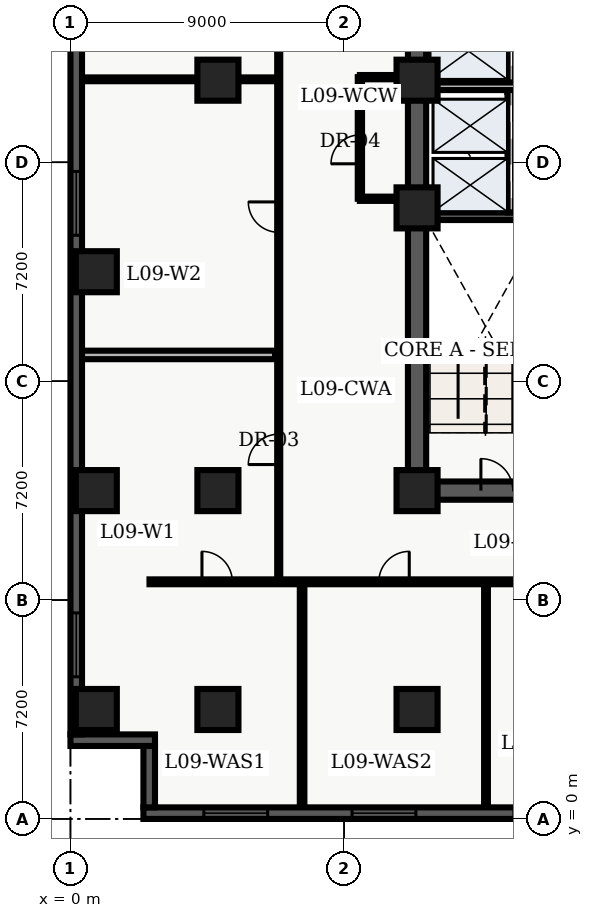
"""IFC4 building model, lengths in metres.
Left out: names, types, materials, properties, quantities, classifications, styles, units other than length and angle.
Written with IfcOpenShell. Run it as: python <this file> out.ifc"""

import sys

from ifc_helpers import new_model, entity, si_unit, converted_unit, direction, frame, origin_with_axes, origin_2d_with_axis, place, context, subcontext, project, spatial, polyline, rectangle, outline, extrude, element, fill, save


model = new_model("IFC4")
c1 = context("Model", 3, precision=1e-05, world=origin_with_axes(), true_north=direction((0.0, 1.0)))
c2 = subcontext(c1, "Body", "Model", "MODEL_VIEW")
j1 = project(units=[si_unit("LENGTHUNIT", "METRE"), converted_unit("PLANEANGLEUNIT", "DEGREE", entity("IfcPlaneAngleMeasure", 0.017), si_unit("PLANEANGLEUNIT", "RADIAN"), dimensions=[0, 0, 0, 0, 0, 0, 0])], contexts=[c1])
p1 = place(None, origin_with_axes())
s1 = spatial("IfcSite", under=j1, at=p1, CompositionType="ELEMENT")
p2 = place(p1, origin_with_axes())
s2 = spatial("IfcBuilding", under=s1, at=p2, CompositionType="ELEMENT")
p3 = place(p2, frame((0.0, 0.0, 40.5), z_axis=(0.0, 0.0, 1.0), x_axis=(1.0, 0.0, 0.0)))
s3 = spatial("IfcBuildingStorey", under=s2, at=p3, CompositionType="ELEMENT", Elevation=40.5)
p4 = place(p3, frame((11.4, 10.8, 0.0), z_axis=(0.0, 0.0, 1.0), x_axis=(0.0, 1.0, 0.0)))
e1 = element("IfcWall", 1, at=p4, inside=s3, PredefinedType="SHEAR", context=c2, shape_type="SweptSolid", body=[
    extrude(outline(polyline([(0.0, -0.3), (27.0, -0.3), (27.0, 0.3), (0.0, 0.3), (0.0, -0.3)])), origin_with_axes(), (0.0, 0.0, 1.0), 3.66),
])
p5 = place(p3, frame((11.4, 10.8, 0.0), z_axis=(0.0, 0.0, 1.0), x_axis=(1.0, 0.0, 0.0)))
e2 = element("IfcWall", 2, at=p5, inside=s3, PredefinedType="SHEAR", context=c2, shape_type="SweptSolid", body=[
    extrude(outline(polyline([(0.0, -0.3), (7.2, -0.3), (7.2, 0.3), (0.0, 0.3), (0.0, -0.3)])), origin_with_axes(), (0.0, 0.0, 1.0), 3.66),
])
p6 = place(p5, frame((2.625, 0.0, 0.0), z_axis=(0.0, 0.0, 1.0), x_axis=(1.0, 0.0, 0.0)))
e3 = element("IfcOpeningElement", 3, at=p6, cuts=e2, PredefinedType="OPENING", context=c2, shape_type="SweptSolid", body=[
    extrude(rectangle(XDim=1.05, YDim=0.62, at=origin_2d_with_axis()), origin_with_axes(), (0.0, 0.0, 1.0), 2.15),
])
p7 = place(p3, frame((11.7, 19.825, 0.0), z_axis=(0.0, 0.0, 1.0), x_axis=(1.0, 0.0, 0.0)))
e4 = element("IfcWall", 4, at=p7, inside=s3, PredefinedType="SHEAR", context=c2, shape_type="SweptSolid", body=[
    extrude(outline(polyline([(0.0, -0.125), (6.6, -0.125), (6.6, 0.125), (0.0, 0.125), (0.0, -0.125)])), origin_with_axes(), (0.0, 0.0, 1.0), 3.66),
])
p8 = place(p3, frame((14.5, 19.95, 0.0), z_axis=(0.0, 0.0, 1.0), x_axis=(0.0, 1.0, 0.0)))
e5 = element("IfcWall", 5, at=p8, inside=s3, PredefinedType="SOLIDWALL", context=c2, shape_type="SweptSolid", body=[
    extrude(outline(polyline([(0.0, -0.125), (6.25, -0.125), (6.25, 0.125), (0.0, 0.125), (0.0, -0.125)])), origin_with_axes(), (0.0, 0.0, 1.0), 2.7),
])
p9 = place(p8, frame((1.025, 0.0, 0.0), z_axis=(0.0, 0.0, 1.0), x_axis=(1.0, 0.0, 0.0)))
e6 = element("IfcOpeningElement", 6, at=p9, cuts=e5, PredefinedType="OPENING", context=c2, shape_type="SweptSolid", body=[
    extrude(rectangle(XDim=1.1, YDim=0.27, at=origin_2d_with_axis()), origin_with_axes(), (0.0, 0.0, 1.0), 2.15),
])
p10 = place(p8, frame((2.975, 0.0, 0.0), z_axis=(0.0, 0.0, 1.0), x_axis=(1.0, 0.0, 0.0)))
e7 = element("IfcOpeningElement", 7, at=p10, cuts=e5, PredefinedType="OPENING", context=c2, shape_type="SweptSolid", body=[
    extrude(rectangle(XDim=1.1, YDim=0.27, at=origin_2d_with_axis()), origin_with_axes(), (0.0, 0.0, 1.0), 2.15),
])
p11 = place(p8, frame((5.425, 0.0, 0.0), z_axis=(0.0, 0.0, 1.0), x_axis=(1.0, 0.0, 0.0)))
e8 = element("IfcOpeningElement", 8, at=p11, cuts=e5, PredefinedType="OPENING", context=c2, shape_type="SweptSolid", body=[
    extrude(rectangle(XDim=1.2, YDim=0.27, at=origin_2d_with_axis()), origin_with_axes(), (0.0, 0.0, 1.0), 2.15),
])
p12 = place(p3, frame((11.7, 24.1, 0.0), z_axis=(0.0, 0.0, 1.0), x_axis=(1.0, 0.0, 0.0)))
e9 = element("IfcWall", 9, at=p12, inside=s3, PredefinedType="SOLIDWALL", context=c2, shape_type="SweptSolid", body=[
    extrude(outline(polyline([(0.0, -0.125), (6.6, -0.125), (6.6, 0.125), (0.0, 0.125), (0.0, -0.125)])), origin_with_axes(), (0.0, 0.0, 1.0), 2.7),
])
p13 = place(p12, frame((3.75, 0.0, 0.0), z_axis=(0.0, 0.0, 1.0), x_axis=(1.0, 0.0, 0.0)))
e10 = element("IfcOpeningElement", 10, at=p13, cuts=e9, PredefinedType="OPENING", context=c2, shape_type="SweptSolid", body=[
    extrude(rectangle(XDim=0.9, YDim=0.27, at=origin_2d_with_axis()), origin_with_axes(), (0.0, 0.0, 1.0), 2.15),
])
for number, where, z_axis, x_axis in (
    (11, (11.4, 3.6, 0.0), (0.0, 0.0, 1.0), (1.0, 0.0, 0.0)),
    (12, (11.4, 10.8, 0.0), (0.0, 0.0, 1.0), (1.0, 0.0, 0.0)),
    (13, (11.4, 20.1, 0.0), (0.0, 0.0, 1.0), (1.0, 0.0, 0.0)),
    (14, (11.4, 24.3, 0.0), (0.0, 0.0, 1.0), (1.0, 0.0, 0.0)),
    (15, (4.85, 3.6, 0.0), (0.0, 0.0, 1.0), (1.0, 0.0, 0.0)),
    (16, (4.85, 10.8, 0.0), (0.0, 0.0, 1.0), (1.0, 0.0, 0.0)),
    (17, (4.85, 24.3, 0.0), (0.0, 0.0, 1.0), (1.0, 0.0, 0.0)),
    (18, (0.85, 3.6, 0.0), (0.0, 0.0, 1.0), (1.0, 0.0, 0.0)),
    (19, (0.85, 10.8, 0.0), (0.0, 0.0, 1.0), (1.0, 0.0, 0.0)),
    (20, (0.85, 18.0, 0.0), (0.0, 0.0, 1.0), (1.0, 0.0, 0.0)),
):
    element("IfcColumn", number, at=place(p3, frame(where, z_axis=z_axis, x_axis=x_axis)), inside=s3, PredefinedType="COLUMN", context=c2, shape_type="SweptSolid", body=[
        extrude(rectangle(XDim=1.35, YDim=1.35, at=origin_2d_with_axis()), origin_with_axes(), (0.0, 0.0, 1.0), 3.9),
    ])
p14 = place(p3, frame((9.52, 20.4, 0.0), z_axis=(0.0, 0.0, 1.0), x_axis=(0.0, 1.0, 0.0)))
e21 = element("IfcWall", 21, at=p14, inside=s3, PredefinedType="PARTITIONING", context=c2, shape_type="SweptSolid", body=[
    extrude(outline(polyline([(0.0, -0.07), (4.0, -0.07), (4.0, 0.07), (0.0, 0.07), (0.0, -0.07)])), origin_with_axes(), (0.0, 0.0, 1.0), 2.7),
])
p15 = place(p14, frame((1.625, 0.0, 0.0), z_axis=(0.0, 0.0, 1.0), x_axis=(1.0, 0.0, 0.0)))
e22 = element("IfcOpeningElement", 22, at=p15, cuts=e21, PredefinedType="OPENING", context=c2, shape_type="SweptSolid", body=[
    extrude(rectangle(XDim=0.95, YDim=0.16, at=origin_2d_with_axis()), origin_with_axes(), (0.0, 0.0, 1.0), 2.15),
])
for number, where, z_axis, x_axis in (
    (23, (9.52, 20.4, 0.0), (0.0, 0.0, 1.0), (1.0, 0.0, 0.0)),
    (24, (9.52, 24.4, 0.0), (0.0, 0.0, 1.0), (1.0, 0.0, 0.0)),
):
    element("IfcWall", number, at=place(p3, frame(where, z_axis=z_axis, x_axis=x_axis)), inside=s3, PredefinedType="PARTITIONING", context=c2, shape_type="SweptSolid", body=[
        extrude(outline(polyline([(0.0, -0.07), (1.58, -0.07), (1.58, 0.07), (0.0, 0.07), (0.0, -0.07)])), origin_with_axes(), (0.0, 0.0, 1.0), 2.7),
    ])
p16 = place(p3, frame((2.6, 7.8, 0.0), z_axis=(0.0, 0.0, 1.0), x_axis=(1.0, 0.0, 0.0)))
e25 = element("IfcWall", 25, at=p16, inside=s3, PredefinedType="PARTITIONING", context=c2, shape_type="SweptSolid", body=[
    extrude(outline(polyline([(0.0, -0.08), (18.55, -0.08), (18.55, 0.08), (0.0, 0.08), (0.0, -0.08)])), origin_with_axes(), (0.0, 0.0, 1.0), 2.7),
])
p17 = place(p16, frame((2.225, 0.0, 0.0), z_axis=(0.0, 0.0, 1.0), x_axis=(1.0, 0.0, 0.0)))
e26 = element("IfcOpeningElement", 26, at=p17, cuts=e25, PredefinedType="OPENING", context=c2, shape_type="SweptSolid", body=[
    extrude(rectangle(XDim=1.0, YDim=0.18, at=origin_2d_with_axis()), origin_with_axes(), (0.0, 0.0, 1.0), 2.15),
])
p18 = place(p16, frame((8.043, 0.0, 0.0), z_axis=(0.0, 0.0, 1.0), x_axis=(1.0, 0.0, 0.0)))
e27 = element("IfcOpeningElement", 27, at=p18, cuts=e25, PredefinedType="OPENING", context=c2, shape_type="SweptSolid", body=[
    extrude(rectangle(XDim=1.0, YDim=0.18, at=origin_2d_with_axis()), origin_with_axes(), (0.0, 0.0, 1.0), 2.15),
])
p19 = place(p16, frame((14.784, 0.0, 0.0), z_axis=(0.0, 0.0, 1.0), x_axis=(1.0, 0.0, 0.0)))
e28 = element("IfcOpeningElement", 28, at=p19, cuts=e25, PredefinedType="OPENING", context=c2, shape_type="SweptSolid", body=[
    extrude(rectangle(XDim=1.0, YDim=0.18, at=origin_2d_with_axis()), origin_with_axes(), (0.0, 0.0, 1.0), 2.15),
])
p20 = place(p3, frame((6.85, 7.8, 0.0), z_axis=(0.0, 0.0, 1.0), x_axis=(0.0, 1.0, 0.0)))
e29 = element("IfcWall", 29, at=p20, inside=s3, PredefinedType="PARTITIONING", context=c2, shape_type="SweptSolid", body=[
    extrude(outline(polyline([(0.0, -0.05), (32.7, -0.05), (32.7, 0.05), (0.0, 0.05), (0.0, -0.05)])), origin_with_axes(), (0.0, 0.0, 1.0), 2.7),
])
p21 = place(p20, frame((4.357, 0.0, 0.0), z_axis=(0.0, 0.0, 1.0), x_axis=(1.0, 0.0, 0.0)))
e30 = element("IfcOpeningElement", 30, at=p21, cuts=e29, PredefinedType="OPENING", context=c2, shape_type="SweptSolid", body=[
    extrude(rectangle(XDim=1.0, YDim=0.12, at=origin_2d_with_axis()), origin_with_axes(), (0.0, 0.0, 1.0), 2.15),
])
p22 = place(p20, frame((11.996, 0.0, 0.0), z_axis=(0.0, 0.0, 1.0), x_axis=(1.0, 0.0, 0.0)))
e31 = element("IfcOpeningElement", 31, at=p22, cuts=e29, PredefinedType="OPENING", context=c2, shape_type="SweptSolid", body=[
    extrude(rectangle(XDim=1.0, YDim=0.12, at=origin_2d_with_axis()), origin_with_axes(), (0.0, 0.0, 1.0), 2.15),
])
p23 = place(p20, frame((22.0, 0.0, 0.0), z_axis=(0.0, 0.0, 1.0), x_axis=(1.0, 0.0, 0.0)))
e32 = element("IfcOpeningElement", 32, at=p23, cuts=e29, PredefinedType="OPENING", context=c2, shape_type="SweptSolid", body=[
    extrude(rectangle(XDim=1.0, YDim=0.12, at=origin_2d_with_axis()), origin_with_axes(), (0.0, 0.0, 1.0), 2.15),
])
p24 = place(p20, frame((31.67, 0.0, 0.0), z_axis=(0.0, 0.0, 1.0), x_axis=(1.0, 0.0, 0.0)))
e33 = element("IfcOpeningElement", 33, at=p24, cuts=e29, PredefinedType="OPENING", context=c2, shape_type="SweptSolid", body=[
    extrude(rectangle(XDim=1.0, YDim=0.12, at=origin_2d_with_axis()), origin_with_axes(), (0.0, 0.0, 1.0), 2.15),
])
p25 = place(p3, frame((0.375, 15.263, 0.0), z_axis=(0.0, 0.0, 1.0), x_axis=(1.0, 0.0, 0.0)))
e34 = element("IfcWall", 34, at=p25, inside=s3, PredefinedType="PARTITIONING", context=c2, shape_type="SweptSolid", body=[
    extrude(outline(polyline([(0.0, -0.14), (6.355, -0.14), (6.355, 0.14), (0.0, 0.14), (0.0, -0.14)])), origin_with_axes(), (0.0, 0.0, 1.0), 2.7),
])
p26 = place(p3, frame((0.375, 24.329, 0.0), z_axis=(0.0, 0.0, 1.0), x_axis=(1.0, 0.0, 0.0)))
e35 = element("IfcWall", 35, at=p26, inside=s3, PredefinedType="PARTITIONING", context=c2, shape_type="SweptSolid", body=[
    extrude(outline(polyline([(0.0, -0.062), (6.355, -0.062), (6.355, 0.062), (0.0, 0.062), (0.0, -0.062)])), origin_with_axes(), (0.0, 0.0, 1.0), 2.7),
])
p27 = place(p3, frame((7.619, 0.36, 0.0), z_axis=(0.0, 0.0, 1.0), x_axis=(0.0, 1.0, 0.0)))
e36 = element("IfcWall", 36, at=p27, inside=s3, PredefinedType="PARTITIONING", context=c2, shape_type="SweptSolid", body=[
    extrude(outline(polyline([(0.0, -0.075), (7.34, -0.075), (7.34, 0.075), (0.0, 0.075), (0.0, -0.075)])), origin_with_axes(), (0.0, 0.0, 1.0), 2.7),
])
p28 = place(p3, frame((13.668, 0.36, 0.0), z_axis=(0.0, 0.0, 1.0), x_axis=(0.0, 1.0, 0.0)))
e37 = element("IfcWall", 37, at=p28, inside=s3, PredefinedType="PARTITIONING", context=c2, shape_type="SweptSolid", body=[
    extrude(outline(polyline([(0.0, -0.062), (7.34, -0.062), (7.34, 0.062), (0.0, 0.062), (0.0, -0.062)])), origin_with_axes(), (0.0, 0.0, 1.0), 2.7),
])
p29 = place(p3, frame((57.22, 0.19, 0.0), z_axis=(0.0, 0.0, 1.0), x_axis=(-1.0, 0.0, 0.0)))
e38 = element("IfcWall", 38, at=p29, inside=s3, PredefinedType="SOLIDWALL", context=c2, shape_type="SweptSolid", body=[
    extrude(outline(polyline([(0.0, -0.19), (54.82, -0.19), (54.82, 0.19), (0.0, 0.19), (0.0, -0.19)])), origin_with_axes(), (0.0, 0.0, 1.0), 3.66),
])
p30 = place(p29, frame((3.037, 0.0, 0.45), z_axis=(0.0, 0.0, 1.0), x_axis=(1.0, 0.0, 0.0)))
e39 = element("IfcOpeningElement", 39, at=p30, cuts=e38, PredefinedType="OPENING", context=c2, shape_type="SweptSolid", body=[
    extrude(rectangle(XDim=2.1, YDim=0.4, at=origin_2d_with_axis()), origin_with_axes(), (0.0, 0.0, 1.0), 2.2),
])
p31 = place(p29, frame((7.912, 0.0, 0.45), z_axis=(0.0, 0.0, 1.0), x_axis=(1.0, 0.0, 0.0)))
e40 = element("IfcOpeningElement", 40, at=p31, cuts=e38, PredefinedType="OPENING", context=c2, shape_type="SweptSolid", body=[
    extrude(rectangle(XDim=2.1, YDim=0.4, at=origin_2d_with_axis()), origin_with_axes(), (0.0, 0.0, 1.0), 2.2),
])
p32 = place(p29, frame((12.786, 0.0, 0.45), z_axis=(0.0, 0.0, 1.0), x_axis=(1.0, 0.0, 0.0)))
e41 = element("IfcOpeningElement", 41, at=p32, cuts=e38, PredefinedType="OPENING", context=c2, shape_type="SweptSolid", body=[
    extrude(rectangle(XDim=2.1, YDim=0.4, at=origin_2d_with_axis()), origin_with_axes(), (0.0, 0.0, 1.0), 2.2),
])
p33 = place(p29, frame((17.661, 0.0, 0.45), z_axis=(0.0, 0.0, 1.0), x_axis=(1.0, 0.0, 0.0)))
e42 = element("IfcOpeningElement", 42, at=p33, cuts=e38, PredefinedType="OPENING", context=c2, shape_type="SweptSolid", body=[
    extrude(rectangle(XDim=2.1, YDim=0.4, at=origin_2d_with_axis()), origin_with_axes(), (0.0, 0.0, 1.0), 2.2),
])
p34 = place(p29, frame((22.535, 0.0, 0.45), z_axis=(0.0, 0.0, 1.0), x_axis=(1.0, 0.0, 0.0)))
e43 = element("IfcOpeningElement", 43, at=p34, cuts=e38, PredefinedType="OPENING", context=c2, shape_type="SweptSolid", body=[
    extrude(rectangle(XDim=2.1, YDim=0.4, at=origin_2d_with_axis()), origin_with_axes(), (0.0, 0.0, 1.0), 2.2),
])
p35 = place(p29, frame((27.41, 0.0, 0.45), z_axis=(0.0, 0.0, 1.0), x_axis=(1.0, 0.0, 0.0)))
e44 = element("IfcOpeningElement", 44, at=p35, cuts=e38, PredefinedType="OPENING", context=c2, shape_type="SweptSolid", body=[
    extrude(rectangle(XDim=2.1, YDim=0.4, at=origin_2d_with_axis()), origin_with_axes(), (0.0, 0.0, 1.0), 2.2),
])
p36 = place(p29, frame((32.285, 0.0, 0.45), z_axis=(0.0, 0.0, 1.0), x_axis=(1.0, 0.0, 0.0)))
e45 = element("IfcOpeningElement", 45, at=p36, cuts=e38, PredefinedType="OPENING", context=c2, shape_type="SweptSolid", body=[
    extrude(rectangle(XDim=2.1, YDim=0.4, at=origin_2d_with_axis()), origin_with_axes(), (0.0, 0.0, 1.0), 2.2),
])
p37 = place(p29, frame((37.159, 0.0, 0.45), z_axis=(0.0, 0.0, 1.0), x_axis=(1.0, 0.0, 0.0)))
e46 = element("IfcOpeningElement", 46, at=p37, cuts=e38, PredefinedType="OPENING", context=c2, shape_type="SweptSolid", body=[
    extrude(rectangle(XDim=2.1, YDim=0.4, at=origin_2d_with_axis()), origin_with_axes(), (0.0, 0.0, 1.0), 2.2),
])
p38 = place(p29, frame((41.584, 0.0, 0.45), z_axis=(0.0, 0.0, 1.0), x_axis=(1.0, 0.0, 0.0)))
e47 = element("IfcOpeningElement", 47, at=p38, cuts=e38, PredefinedType="OPENING", context=c2, shape_type="SweptSolid", body=[
    extrude(rectangle(XDim=2.1, YDim=0.4, at=origin_2d_with_axis()), origin_with_axes(), (0.0, 0.0, 1.0), 2.2),
])
p39 = place(p29, frame((46.908, 0.0, 0.45), z_axis=(0.0, 0.0, 1.0), x_axis=(1.0, 0.0, 0.0)))
e48 = element("IfcOpeningElement", 48, at=p39, cuts=e38, PredefinedType="OPENING", context=c2, shape_type="SweptSolid", body=[
    extrude(rectangle(XDim=2.1, YDim=0.4, at=origin_2d_with_axis()), origin_with_axes(), (0.0, 0.0, 1.0), 2.2),
])
p40 = place(p29, frame((51.783, 0.0, 0.45), z_axis=(0.0, 0.0, 1.0), x_axis=(1.0, 0.0, 0.0)))
e49 = element("IfcOpeningElement", 49, at=p40, cuts=e38, PredefinedType="OPENING", context=c2, shape_type="SweptSolid", body=[
    extrude(rectangle(XDim=2.1, YDim=0.4, at=origin_2d_with_axis()), origin_with_axes(), (0.0, 0.0, 1.0), 2.2),
])
p41 = place(p3, frame((2.59, 0.38, 0.0), z_axis=(0.0, 0.0, 1.0), x_axis=(0.0, 1.0, 0.0)))
e50 = element("IfcWall", 50, at=p41, inside=s3, PredefinedType="SOLIDWALL", context=c2, shape_type="SweptSolid", body=[
    extrude(outline(polyline([(0.0, -0.19), (2.02, -0.19), (2.02, 0.19), (0.0, 0.19), (0.0, -0.19)])), origin_with_axes(), (0.0, 0.0, 1.0), 3.66),
])
p42 = place(p3, frame((2.78, 2.59, 0.0), z_axis=(0.0, 0.0, 1.0), x_axis=(-1.0, 0.0, 0.0)))
e51 = element("IfcWall", 51, at=p42, inside=s3, PredefinedType="SOLIDWALL", context=c2, shape_type="SweptSolid", body=[
    extrude(outline(polyline([(0.0, -0.19), (2.78, -0.19), (2.78, 0.19), (0.0, 0.19), (0.0, -0.19)])), origin_with_axes(), (0.0, 0.0, 1.0), 3.66),
])
p43 = place(p3, frame((0.19, 2.78, 0.0), z_axis=(0.0, 0.0, 1.0), x_axis=(0.0, 1.0, 0.0)))
e52 = element("IfcWall", 52, at=p43, inside=s3, PredefinedType="SOLIDWALL", context=c2, shape_type="SweptSolid", body=[
    extrude(outline(polyline([(0.0, -0.19), (43.42, -0.19), (43.42, 0.19), (0.0, 0.19), (0.0, -0.19)])), origin_with_axes(), (0.0, 0.0, 1.0), 3.66),
])
p44 = place(p43, frame((2.946, 0.0, 0.45), z_axis=(0.0, 0.0, 1.0), x_axis=(1.0, 0.0, 0.0)))
e53 = element("IfcOpeningElement", 53, at=p44, cuts=e52, PredefinedType="OPENING", context=c2, shape_type="SweptSolid", body=[
    extrude(rectangle(XDim=2.1, YDim=0.4, at=origin_2d_with_axis()), origin_with_axes(), (0.0, 0.0, 1.0), 2.2),
])
p45 = place(p43, frame((17.469, 0.0, 0.45), z_axis=(0.0, 0.0, 1.0), x_axis=(1.0, 0.0, 0.0)))
e54 = element("IfcOpeningElement", 54, at=p45, cuts=e52, PredefinedType="OPENING", context=c2, shape_type="SweptSolid", body=[
    extrude(rectangle(XDim=2.1, YDim=0.4, at=origin_2d_with_axis()), origin_with_axes(), (0.0, 0.0, 1.0), 2.2),
])
p46 = place(p43, frame((26.401, 0.0, 0.45), z_axis=(0.0, 0.0, 1.0), x_axis=(1.0, 0.0, 0.0)))
e55 = element("IfcOpeningElement", 55, at=p46, cuts=e52, PredefinedType="OPENING", context=c2, shape_type="SweptSolid", body=[
    extrude(rectangle(XDim=2.1, YDim=0.4, at=origin_2d_with_axis()), origin_with_axes(), (0.0, 0.0, 1.0), 2.2),
])
p47 = place(p43, frame((30.642, 0.0, 0.45), z_axis=(0.0, 0.0, 1.0), x_axis=(1.0, 0.0, 0.0)))
e56 = element("IfcOpeningElement", 56, at=p47, cuts=e52, PredefinedType="OPENING", context=c2, shape_type="SweptSolid", body=[
    extrude(rectangle(XDim=2.1, YDim=0.4, at=origin_2d_with_axis()), origin_with_axes(), (0.0, 0.0, 1.0), 2.2),
])
p48 = place(p43, frame((40.024, 0.0, 0.45), z_axis=(0.0, 0.0, 1.0), x_axis=(1.0, 0.0, 0.0)))
e57 = element("IfcOpeningElement", 57, at=p48, cuts=e52, PredefinedType="OPENING", context=c2, shape_type="SweptSolid", body=[
    extrude(rectangle(XDim=2.1, YDim=0.4, at=origin_2d_with_axis()), origin_with_axes(), (0.0, 0.0, 1.0), 2.2),
])
p49 = place(p8, frame((1.025, 0.0, 0.0), z_axis=(0.0, 0.0, 1.0), x_axis=(1.0, 0.0, 0.0)))
e58 = element("IfcDoor", 58, at=p49, inside=s3, OperationType="SLIDING_TO_LEFT", PredefinedType="DOOR", context=c2, shape_type="SweptSolid", body=[
    extrude(rectangle(XDim=1.1, YDim=0.09, at=origin_2d_with_axis()), origin_with_axes(), (0.0, 0.0, 1.0), 2.15),
])
fill(e6, e58)
p50 = place(p8, frame((2.975, 0.0, 0.0), z_axis=(0.0, 0.0, 1.0), x_axis=(1.0, 0.0, 0.0)))
e59 = element("IfcDoor", 59, at=p50, inside=s3, OperationType="SLIDING_TO_RIGHT", PredefinedType="DOOR", context=c2, shape_type="SweptSolid", body=[
    extrude(rectangle(XDim=1.1, YDim=0.09, at=origin_2d_with_axis()), origin_with_axes(), (0.0, 0.0, 1.0), 2.15),
])
fill(e7, e59)
p51 = place(p8, frame((5.425, 0.0, 0.0), z_axis=(0.0, 0.0, 1.0), x_axis=(1.0, 0.0, 0.0)))
e60 = element("IfcDoor", 60, at=p51, inside=s3, OperationType="DOUBLE_DOOR_SLIDING", PredefinedType="DOOR", context=c2, shape_type="SweptSolid", body=[
    extrude(rectangle(XDim=1.2, YDim=0.09, at=origin_2d_with_axis()), origin_with_axes(), (0.0, 0.0, 1.0), 2.15),
])
fill(e8, e60)
p52 = place(p5, frame((2.625, 0.0, 0.0), z_axis=(0.0, 0.0, 1.0), x_axis=(1.0, 0.0, 0.0)))
e61 = element("IfcDoor", 61, at=p52, inside=s3, OperationType="SINGLE_SWING_LEFT", PredefinedType="DOOR", context=c2, shape_type="SweptSolid", body=[
    extrude(rectangle(XDim=1.05, YDim=0.09, at=origin_2d_with_axis()), origin_with_axes(), (0.0, 0.0, 1.0), 2.15),
])
fill(e3, e61)
p53 = place(p14, frame((1.625, 0.0, 0.0), z_axis=(0.0, 0.0, 1.0), x_axis=(1.0, 0.0, 0.0)))
e62 = element("IfcDoor", 62, at=p53, inside=s3, OperationType="SINGLE_SWING_LEFT", PredefinedType="DOOR", context=c2, shape_type="SweptSolid", body=[
    extrude(rectangle(XDim=0.95, YDim=0.084, at=origin_2d_with_axis()), origin_with_axes(), (0.0, 0.0, 1.0), 2.15),
])
fill(e22, e62)
p54 = place(p20, frame((4.357, 0.0, 0.0), z_axis=(0.0, 0.0, 1.0), x_axis=(1.0, 0.0, 0.0)))
e63 = element("IfcDoor", 63, at=p54, inside=s3, OperationType="SINGLE_SWING_LEFT", PredefinedType="DOOR", context=c2, shape_type="SweptSolid", body=[
    extrude(rectangle(XDim=1.0, YDim=0.06, at=origin_2d_with_axis()), origin_with_axes(), (0.0, 0.0, 1.0), 2.15),
])
fill(e30, e63)
p55 = place(p20, frame((11.996, 0.0, 0.0), z_axis=(0.0, 0.0, 1.0), x_axis=(1.0, 0.0, 0.0)))
e64 = element("IfcDoor", 64, at=p55, inside=s3, OperationType="SINGLE_SWING_RIGHT", PredefinedType="DOOR", context=c2, shape_type="SweptSolid", body=[
    extrude(rectangle(XDim=1.0, YDim=0.06, at=origin_2d_with_axis()), origin_with_axes(), (0.0, 0.0, 1.0), 2.15),
])
fill(e31, e64)
p56 = place(p16, frame((2.225, 0.0, 0.0), z_axis=(0.0, 0.0, 1.0), x_axis=(1.0, 0.0, 0.0)))
e65 = element("IfcDoor", 65, at=p56, inside=s3, OperationType="SINGLE_SWING_LEFT", PredefinedType="DOOR", context=c2, shape_type="SweptSolid", body=[
    extrude(rectangle(XDim=1.0, YDim=0.09, at=origin_2d_with_axis()), origin_with_axes(), (0.0, 0.0, 1.0), 2.15),
])
fill(e26, e65)
p57 = place(p16, frame((8.043, 0.0, 0.0), z_axis=(0.0, 0.0, 1.0), x_axis=(1.0, 0.0, 0.0)))
e66 = element("IfcDoor", 66, at=p57, inside=s3, OperationType="SINGLE_SWING_RIGHT", PredefinedType="DOOR", context=c2, shape_type="SweptSolid", body=[
    extrude(rectangle(XDim=1.0, YDim=0.09, at=origin_2d_with_axis()), origin_with_axes(), (0.0, 0.0, 1.0), 2.15),
])
fill(e27, e66)
p58 = place(p29, frame((46.908, 0.0, 0.45), z_axis=(0.0, 0.0, 1.0), x_axis=(1.0, 0.0, 0.0)))
e67 = element("IfcWindow", 67, at=p58, inside=s3, PredefinedType="WINDOW", context=c2, shape_type="SweptSolid", body=[
    extrude(rectangle(XDim=2.1, YDim=0.09, at=origin_2d_with_axis()), origin_with_axes(), (0.0, 0.0, 1.0), 2.2),
])
fill(e48, e67)
p59 = place(p29, frame((51.783, 0.0, 0.45), z_axis=(0.0, 0.0, 1.0), x_axis=(1.0, 0.0, 0.0)))
e68 = element("IfcWindow", 68, at=p59, inside=s3, PredefinedType="WINDOW", context=c2, shape_type="SweptSolid", body=[
    extrude(rectangle(XDim=2.1, YDim=0.09, at=origin_2d_with_axis()), origin_with_axes(), (0.0, 0.0, 1.0), 2.2),
])
fill(e49, e68)
p60 = place(p43, frame((2.946, 0.0, 0.45), z_axis=(0.0, 0.0, 1.0), x_axis=(1.0, 0.0, 0.0)))
e69 = element("IfcWindow", 69, at=p60, inside=s3, PredefinedType="WINDOW", context=c2, shape_type="SweptSolid", body=[
    extrude(rectangle(XDim=2.1, YDim=0.09, at=origin_2d_with_axis()), origin_with_axes(), (0.0, 0.0, 1.0), 2.2),
])
fill(e53, e69)
p61 = place(p43, frame((17.469, 0.0, 0.45), z_axis=(0.0, 0.0, 1.0), x_axis=(1.0, 0.0, 0.0)))
e70 = element("IfcWindow", 70, at=p61, inside=s3, PredefinedType="WINDOW", context=c2, shape_type="SweptSolid", body=[
    extrude(rectangle(XDim=2.1, YDim=0.09, at=origin_2d_with_axis()), origin_with_axes(), (0.0, 0.0, 1.0), 2.2),
])
fill(e54, e70)
save(model, sys.argv[1])
